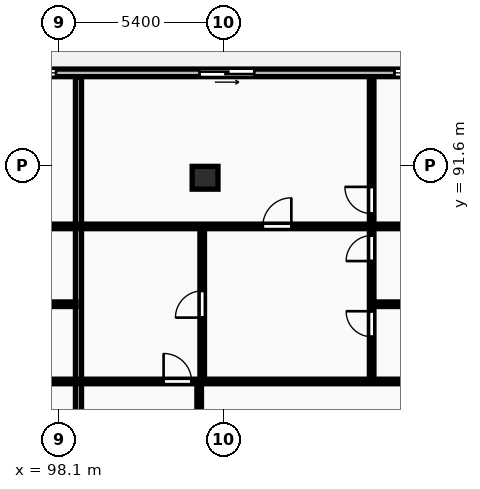
"""IFC4 building model, lengths in metres.
Left out: names, types, materials, properties, quantities, classifications, styles, units other than length and angle.
Written with IfcOpenShell. Run it as: python <this file> out.ifc"""

import sys

from ifc_helpers import new_model, si_unit, direction, frame, frame_2d, origin, origin_2d, place, context, subcontext, project, spatial, rectangle, extrude, element, fill, save


model = new_model("IFC4")
c1 = context("Model", 3, precision=1e-05, world=origin(), true_north=direction((0.0, 1.0)))
c2 = subcontext(c1, "Body", "Model", "MODEL_VIEW")
j1 = project(units=[si_unit("LENGTHUNIT", "METRE"), si_unit("PLANEANGLEUNIT", "RADIAN")], contexts=[c1])
p1 = place(None, origin())
s1 = spatial("IfcSite", under=j1, at=p1, CompositionType="ELEMENT")
p2 = place(p1, origin())
s2 = spatial("IfcBuilding", under=s1, at=p2, CompositionType="ELEMENT")
p3 = place(p2, frame((0.0, 0.0, 207.6)))
s3 = spatial("IfcBuildingStorey", under=s2, at=p3, CompositionType="ELEMENT", Elevation=207.6)
p4 = place(p3, frame((102.9, 91.2, 0.0), z_axis=(0.0, 0.0, 1.0), x_axis=(1.0, 0.0, 0.0)))
e1 = element("IfcColumn", 1, at=p4, inside=s3, PredefinedType="COLUMN", context=c2, shape_type="SweptSolid", body=[
    extrude(rectangle(XDim=0.85, YDim=0.75, at=origin_2d()), origin(), (0.0, 0.0, 1.0), 3.25),
])
p5 = place(p3, frame((128.4, 94.65, 0.0), z_axis=(0.0, 0.0, 1.0), x_axis=(-1.0, 0.0, 0.0)))
e2 = element("IfcWall", 2, at=p5, inside=s3, PredefinedType="STANDARD", context=c2, shape_type="SweptSolid", body=[
    extrude(rectangle(XDim=68.6, YDim=0.25, at=frame_2d((34.3, 0.0))), origin(), (0.0, 0.0, 1.0), 2.97),
])
p6 = place(p5, frame((62.6, 0.0, 0.0)))
e3 = element("IfcOpeningElement", 3, at=p6, cuts=e2, PredefinedType="OPENING", context=c2, shape_type="SweptSolid", body=[
    extrude(rectangle(XDim=1.8, YDim=2.2, at=frame_2d((0.9, 1.1))), frame((0.0, 0.135, 0.0), z_axis=(0.0, -1.0, 0.0), x_axis=(1.0, 0.0, 0.0)), (0.0, 0.0, 1.0), 0.27),
])
p7 = place(p5, frame((56.252, 0.0, 0.85)))
e4 = element("IfcOpeningElement", 4, at=p7, cuts=e2, PredefinedType="OPENING", context=c2, shape_type="SweptSolid", body=[
    extrude(rectangle(XDim=1.8, YDim=1.8, at=frame_2d((0.9, 0.9))), frame((0.0, 0.135, 0.0), z_axis=(0.0, -1.0, 0.0), x_axis=(1.0, 0.0, 0.0)), (0.0, 0.0, 1.0), 0.27),
])
p8 = place(p5, frame((49.882, 0.0, 0.0)))
e5 = element("IfcOpeningElement", 5, at=p8, cuts=e2, PredefinedType="OPENING", context=c2, shape_type="SweptSolid", body=[
    extrude(rectangle(XDim=1.8, YDim=2.2, at=frame_2d((0.9, 1.1))), frame((0.0, 0.135, 0.0), z_axis=(0.0, -1.0, 0.0), x_axis=(1.0, 0.0, 0.0)), (0.0, 0.0, 1.0), 0.27),
])
p9 = place(p5, frame((43.47, 0.0, 0.85)))
e6 = element("IfcOpeningElement", 6, at=p9, cuts=e2, PredefinedType="OPENING", context=c2, shape_type="SweptSolid", body=[
    extrude(rectangle(XDim=1.8, YDim=1.8, at=frame_2d((0.9, 0.9))), frame((0.0, 0.135, 0.0), z_axis=(0.0, -1.0, 0.0), x_axis=(1.0, 0.0, 0.0)), (0.0, 0.0, 1.0), 0.27),
])
p10 = place(p5, frame((36.75, 0.0, 0.0)))
e7 = element("IfcOpeningElement", 7, at=p10, cuts=e2, PredefinedType="OPENING", context=c2, shape_type="SweptSolid", body=[
    extrude(rectangle(XDim=1.8, YDim=2.2, at=frame_2d((0.9, 1.1))), frame((0.0, 0.135, 0.0), z_axis=(0.0, -1.0, 0.0), x_axis=(1.0, 0.0, 0.0)), (0.0, 0.0, 1.0), 0.27),
])
p11 = place(p5, frame((30.402, 0.0, 0.85)))
e8 = element("IfcOpeningElement", 8, at=p11, cuts=e2, PredefinedType="OPENING", context=c2, shape_type="SweptSolid", body=[
    extrude(rectangle(XDim=1.8, YDim=1.8, at=frame_2d((0.9, 0.9))), frame((0.0, 0.135, 0.0), z_axis=(0.0, -1.0, 0.0), x_axis=(1.0, 0.0, 0.0)), (0.0, 0.0, 1.0), 0.27),
])
p12 = place(p5, frame((23.882, 0.0, 0.0)))
e9 = element("IfcOpeningElement", 9, at=p12, cuts=e2, PredefinedType="OPENING", context=c2, shape_type="SweptSolid", body=[
    extrude(rectangle(XDim=1.8, YDim=2.2, at=frame_2d((0.9, 1.1))), frame((0.0, 0.135, 0.0), z_axis=(0.0, -1.0, 0.0), x_axis=(1.0, 0.0, 0.0)), (0.0, 0.0, 1.0), 0.27),
])
p13 = place(p5, frame((17.47, 0.0, 0.85)))
e10 = element("IfcOpeningElement", 10, at=p13, cuts=e2, PredefinedType="OPENING", context=c2, shape_type="SweptSolid", body=[
    extrude(rectangle(XDim=1.8, YDim=1.8, at=frame_2d((0.9, 0.9))), frame((0.0, 0.135, 0.0), z_axis=(0.0, -1.0, 0.0), x_axis=(1.0, 0.0, 0.0)), (0.0, 0.0, 1.0), 0.27),
])
p14 = place(p5, frame((9.48, 0.0, 0.85)))
e11 = element("IfcOpeningElement", 11, at=p14, cuts=e2, PredefinedType="OPENING", context=c2, shape_type="SweptSolid", body=[
    extrude(rectangle(XDim=1.8, YDim=1.8, at=frame_2d((0.9, 0.9))), frame((0.0, 0.135, 0.0), z_axis=(0.0, -1.0, 0.0), x_axis=(1.0, 0.0, 0.0)), (0.0, 0.0, 1.0), 0.27),
])
p15 = place(p5, frame((5.23, 0.0, 0.85)))
e12 = element("IfcOpeningElement", 12, at=p15, cuts=e2, PredefinedType="OPENING", context=c2, shape_type="SweptSolid", body=[
    extrude(rectangle(XDim=2.4, YDim=1.9, at=frame_2d((1.2, 0.95))), frame((0.0, 0.135, 0.0), z_axis=(0.0, -1.0, 0.0), x_axis=(1.0, 0.0, 0.0)), (0.0, 0.0, 1.0), 0.27),
])
p16 = place(p5, frame((13.455, 0.0, 0.0)))
e13 = element("IfcOpeningElement", 13, at=p16, cuts=e2, PredefinedType="OPENING", context=c2, shape_type="SweptSolid", body=[
    extrude(rectangle(XDim=1.8, YDim=2.2, at=frame_2d((0.9, 1.1))), frame((0.0, 0.135, 0.0), z_axis=(0.0, -1.0, 0.0), x_axis=(1.0, 0.0, 0.0)), (0.0, 0.0, 1.0), 0.27),
])
p17 = place(p5, frame((1.025, 0.0, 0.85)))
e14 = element("IfcOpeningElement", 14, at=p17, cuts=e2, PredefinedType="OPENING", context=c2, shape_type="SweptSolid", body=[
    extrude(rectangle(XDim=2.4, YDim=1.9, at=frame_2d((1.2, 0.95))), frame((0.0, 0.135, 0.0), z_axis=(0.0, -1.0, 0.0), x_axis=(1.0, 0.0, 0.0)), (0.0, 0.0, 1.0), 0.27),
])
p18 = place(p3, frame((98.736, 70.18, 0.0), z_axis=(0.0, 0.0, 1.0), x_axis=(0.0, 1.0, 0.0)))
e15 = element("IfcWall", 15, at=p18, inside=s3, PredefinedType="PARTITIONING", context=c2, shape_type="SweptSolid", body=[
    extrude(rectangle(XDim=24.32, YDim=0.2, at=frame_2d((12.16, 0.0))), origin(), (0.0, 0.0, 1.0), 2.97),
])
p19 = place(p3, frame((95.64, 87.04, 0.0), z_axis=(0.0, 0.0, 1.0), x_axis=(1.0, 0.0, 0.0)))
e16 = element("IfcWall", 16, at=p19, inside=s3, PredefinedType="PARTITIONING", context=c2, shape_type="SweptSolid", body=[
    extrude(rectangle(XDim=3.016, YDim=0.15, at=frame_2d((1.508, 0.0))), origin(), (0.0, 0.0, 1.0), 2.97),
])
p20 = place(p3, frame((85.88, 84.5, 0.0), z_axis=(0.0, 0.0, 1.0), x_axis=(1.0, 0.0, 0.0)))
e17 = element("IfcWall", 17, at=p20, inside=s3, PredefinedType="PARTITIONING", context=c2, shape_type="SweptSolid", body=[
    extrude(rectangle(XDim=12.776, YDim=0.15, at=frame_2d((6.388, 0.0))), origin(), (0.0, 0.0, 1.0), 2.97),
])
p21 = place(p20, frame((2.72, 0.0, 0.0)))
e18 = element("IfcOpeningElement", 18, at=p21, cuts=e17, PredefinedType="OPENING", context=c2, shape_type="SweptSolid", body=[
    extrude(rectangle(XDim=0.92, YDim=2.08, at=frame_2d((0.46, 1.04))), frame((0.0, 0.085, 0.0), z_axis=(0.0, -1.0, 0.0), x_axis=(1.0, 0.0, 0.0)), (0.0, 0.0, 1.0), 0.17),
])
p22 = place(p3, frame((85.88, 89.6, 0.0), z_axis=(0.0, 0.0, 1.0), x_axis=(1.0, 0.0, 0.0)))
e19 = element("IfcWall", 19, at=p22, inside=s3, PredefinedType="PARTITIONING", context=c2, shape_type="SweptSolid", body=[
    extrude(rectangle(XDim=12.776, YDim=0.15, at=frame_2d((6.388, 0.0))), origin(), (0.0, 0.0, 1.0), 2.97),
])
p23 = place(p22, frame((5.206, 0.0, 0.0)))
e20 = element("IfcOpeningElement", 20, at=p23, cuts=e19, PredefinedType="OPENING", context=c2, shape_type="SweptSolid", body=[
    extrude(rectangle(XDim=0.94, YDim=2.1, at=frame_2d((0.47, 1.05))), frame((0.0, 0.085, 0.0), z_axis=(0.0, -1.0, 0.0), x_axis=(1.0, 0.0, 0.0)), (0.0, 0.0, 1.0), 0.17),
])
p24 = place(p3, frame((102.706, 70.16, 0.0), z_axis=(0.0, 0.0, 1.0), x_axis=(0.0, 1.0, 0.0)))
e21 = element("IfcWall", 21, at=p24, inside=s3, PredefinedType="PARTITIONING", context=c2, shape_type="SweptSolid", body=[
    extrude(rectangle(XDim=14.3, YDim=0.15, at=frame_2d((7.15, 0.0))), origin(), (0.0, 0.0, 1.0), 2.277),
])
p25 = place(p24, frame((6.02, 0.0, 0.0)))
e22 = element("IfcOpeningElement", 22, at=p25, cuts=e21, PredefinedType="OPENING", context=c2, shape_type="SweptSolid", body=[
    extrude(rectangle(XDim=0.88, YDim=2.06, at=frame_2d((0.44, 1.03))), frame((0.0, 0.085, 0.0), z_axis=(0.0, -1.0, 0.0), x_axis=(1.0, 0.0, 0.0)), (0.0, 0.0, 1.0), 0.17),
])
p26 = place(p3, frame((102.806, 84.54, 0.0), z_axis=(0.0, 0.0, 1.0), x_axis=(0.0, 1.0, 0.0)))
e23 = element("IfcWall", 23, at=p26, inside=s3, PredefinedType="PARTITIONING", context=c2, shape_type="SweptSolid", body=[
    extrude(rectangle(XDim=5.0, YDim=0.15, at=frame_2d((2.5, 0.0))), origin(), (0.0, 0.0, 1.0), 2.277),
])
p27 = place(p26, frame((2.06, 0.0, 0.0)))
e24 = element("IfcOpeningElement", 24, at=p27, cuts=e23, PredefinedType="OPENING", context=c2, shape_type="SweptSolid", body=[
    extrude(rectangle(XDim=0.88, YDim=2.06, at=frame_2d((0.44, 1.03))), frame((0.0, 0.085, 0.0), z_axis=(0.0, -1.0, 0.0), x_axis=(1.0, 0.0, 0.0)), (0.0, 0.0, 1.0), 0.17),
])
p28 = place(p3, frame((108.44, 87.04, 0.0), z_axis=(0.0, 0.0, 1.0), x_axis=(1.0, 0.0, 0.0)))
e25 = element("IfcWall", 25, at=p28, inside=s3, PredefinedType="PARTITIONING", context=c2, shape_type="SweptSolid", body=[
    extrude(rectangle(XDim=3.28, YDim=0.15, at=frame_2d((1.64, 0.0))), origin(), (0.0, 0.0, 1.0), 2.97),
])
p29 = place(p3, frame((108.38, 84.54, 0.0), z_axis=(0.0, 0.0, 1.0), x_axis=(0.0, 1.0, 0.0)))
e26 = element("IfcWall", 26, at=p29, inside=s3, PredefinedType="PARTITIONING", context=c2, shape_type="SweptSolid", body=[
    extrude(rectangle(XDim=9.96, YDim=0.15, at=frame_2d((4.98, 0.0))), origin(), (0.0, 0.0, 1.0), 2.97),
])
p30 = place(p29, frame((1.43, 0.0, 0.0)))
e27 = element("IfcOpeningElement", 27, at=p30, cuts=e26, PredefinedType="OPENING", context=c2, shape_type="SweptSolid", body=[
    extrude(rectangle(XDim=0.84, YDim=2.04, at=frame_2d((0.42, 1.02))), frame((0.0, 0.085, 0.0), z_axis=(0.0, -1.0, 0.0), x_axis=(1.0, 0.0, 0.0)), (0.0, 0.0, 1.0), 0.17),
])
p31 = place(p29, frame((3.92, 0.0, 0.0)))
e28 = element("IfcOpeningElement", 28, at=p31, cuts=e26, PredefinedType="OPENING", context=c2, shape_type="SweptSolid", body=[
    extrude(rectangle(XDim=0.84, YDim=2.04, at=frame_2d((0.42, 1.02))), frame((0.0, 0.085, 0.0), z_axis=(0.0, -1.0, 0.0), x_axis=(1.0, 0.0, 0.0)), (0.0, 0.0, 1.0), 0.17),
])
p32 = place(p29, frame((5.48, 0.0, 0.0)))
e29 = element("IfcOpeningElement", 29, at=p32, cuts=e26, PredefinedType="OPENING", context=c2, shape_type="SweptSolid", body=[
    extrude(rectangle(XDim=0.88, YDim=2.06, at=frame_2d((0.44, 1.03))), frame((0.0, 0.085, 0.0), z_axis=(0.0, -1.0, 0.0), x_axis=(1.0, 0.0, 0.0)), (0.0, 0.0, 1.0), 0.17),
])
p33 = place(p3, frame((98.816, 84.5, 0.0), z_axis=(0.0, 0.0, 1.0), x_axis=(1.0, 0.0, 0.0)))
e30 = element("IfcWall", 30, at=p33, inside=s3, PredefinedType="PARTITIONING", context=c2, shape_type="SweptSolid", body=[
    extrude(rectangle(XDim=12.904, YDim=0.15, at=frame_2d((6.452, 0.0))), origin(), (0.0, 0.0, 1.0), 2.97),
])
p34 = place(p33, frame((2.72, 0.0, 0.0)))
e31 = element("IfcOpeningElement", 31, at=p34, cuts=e30, PredefinedType="OPENING", context=c2, shape_type="SweptSolid", body=[
    extrude(rectangle(XDim=0.92, YDim=2.08, at=frame_2d((0.46, 1.04))), frame((0.0, 0.085, 0.0), z_axis=(0.0, -1.0, 0.0), x_axis=(1.0, 0.0, 0.0)), (0.0, 0.0, 1.0), 0.17),
])
p35 = place(p3, frame((98.816, 89.6, 0.0), z_axis=(0.0, 0.0, 1.0), x_axis=(1.0, 0.0, 0.0)))
e32 = element("IfcWall", 32, at=p35, inside=s3, PredefinedType="PARTITIONING", context=c2, shape_type="SweptSolid", body=[
    extrude(rectangle(XDim=12.904, YDim=0.15, at=frame_2d((6.452, 0.0))), origin(), (0.0, 0.0, 1.0), 2.97),
])
p36 = place(p35, frame((5.982, 0.0, 0.0)))
e33 = element("IfcOpeningElement", 33, at=p36, cuts=e32, PredefinedType="OPENING", context=c2, shape_type="SweptSolid", body=[
    extrude(rectangle(XDim=0.94, YDim=2.1, at=frame_2d((0.47, 1.05))), frame((0.0, 0.085, 0.0), z_axis=(0.0, -1.0, 0.0), x_axis=(1.0, 0.0, 0.0)), (0.0, 0.0, 1.0), 0.17),
])
p37 = place(p11, origin())
e34 = element("IfcWindow", 34, at=p37, inside=s3, PartitioningType="SINGLE_PANEL", PredefinedType="WINDOW", context=c2, shape_type="SweptSolid", body=[
    extrude(rectangle(XDim=1.8, YDim=1.8, at=frame_2d((0.9, 0.9))), frame((0.0, 0.03, 0.0), z_axis=(0.0, -1.0, 0.0), x_axis=(1.0, 0.0, 0.0)), (0.0, 0.0, 1.0), 0.06),
])
fill(e8, e34)
p38 = place(p12, origin())
e35 = element("IfcDoor", 35, at=p38, inside=s3, OperationType="SLIDING_TO_LEFT", PredefinedType="DOOR", context=c2, shape_type="SweptSolid", body=[
    extrude(rectangle(XDim=1.8, YDim=2.2, at=frame_2d((0.9, 1.1))), frame((0.0, 0.025, 0.0), z_axis=(0.0, -1.0, 0.0), x_axis=(1.0, 0.0, 0.0)), (0.0, 0.0, 1.0), 0.05),
])
fill(e9, e35)
p39 = place(p13, origin())
e36 = element("IfcWindow", 36, at=p39, inside=s3, PartitioningType="SINGLE_PANEL", PredefinedType="WINDOW", context=c2, shape_type="SweptSolid", body=[
    extrude(rectangle(XDim=1.8, YDim=1.8, at=frame_2d((0.9, 0.9))), frame((0.0, 0.03, 0.0), z_axis=(0.0, -1.0, 0.0), x_axis=(1.0, 0.0, 0.0)), (0.0, 0.0, 1.0), 0.06),
])
fill(e10, e36)
p40 = place(p27, origin())
e37 = element("IfcDoor", 37, at=p40, inside=s3, OperationType="SINGLE_SWING_LEFT", PredefinedType="DOOR", context=c2, shape_type="SweptSolid", body=[
    extrude(rectangle(XDim=0.88, YDim=2.06, at=frame_2d((0.44, 1.03))), frame((0.0, 0.025, 0.0), z_axis=(0.0, -1.0, 0.0), x_axis=(1.0, 0.0, 0.0)), (0.0, 0.0, 1.0), 0.05),
])
fill(e24, e37)
p41 = place(p30, origin())
e38 = element("IfcDoor", 38, at=p41, inside=s3, OperationType="SINGLE_SWING_RIGHT", PredefinedType="DOOR", context=c2, shape_type="SweptSolid", body=[
    extrude(rectangle(XDim=0.84, YDim=2.04, at=frame_2d((0.42, 1.02))), frame((0.0, 0.025, 0.0), z_axis=(0.0, -1.0, 0.0), x_axis=(1.0, 0.0, 0.0)), (0.0, 0.0, 1.0), 0.05),
])
fill(e27, e38)
p42 = place(p31, origin())
e39 = element("IfcDoor", 39, at=p42, inside=s3, OperationType="SINGLE_SWING_LEFT", PredefinedType="DOOR", context=c2, shape_type="SweptSolid", body=[
    extrude(rectangle(XDim=0.84, YDim=2.04, at=frame_2d((0.42, 1.02))), frame((0.0, 0.025, 0.0), z_axis=(0.0, -1.0, 0.0), x_axis=(1.0, 0.0, 0.0)), (0.0, 0.0, 1.0), 0.05),
])
fill(e28, e39)
p43 = place(p32, origin())
e40 = element("IfcDoor", 40, at=p43, inside=s3, OperationType="SINGLE_SWING_RIGHT", PredefinedType="DOOR", context=c2, shape_type="SweptSolid", body=[
    extrude(rectangle(XDim=0.88, YDim=2.06, at=frame_2d((0.44, 1.03))), frame((0.0, 0.025, 0.0), z_axis=(0.0, -1.0, 0.0), x_axis=(1.0, 0.0, 0.0)), (0.0, 0.0, 1.0), 0.05),
])
fill(e29, e40)
p44 = place(p34, origin())
e41 = element("IfcDoor", 41, at=p44, inside=s3, OperationType="SINGLE_SWING_LEFT", PredefinedType="DOOR", context=c2, shape_type="SweptSolid", body=[
    extrude(rectangle(XDim=0.92, YDim=2.08, at=frame_2d((0.46, 1.04))), frame((0.0, 0.025, 0.0), z_axis=(0.0, -1.0, 0.0), x_axis=(1.0, 0.0, 0.0)), (0.0, 0.0, 1.0), 0.05),
])
fill(e31, e41)
p45 = place(p36, origin())
e42 = element("IfcDoor", 42, at=p45, inside=s3, OperationType="SINGLE_SWING_RIGHT", PredefinedType="DOOR", context=c2, shape_type="SweptSolid", body=[
    extrude(rectangle(XDim=0.94, YDim=2.1, at=frame_2d((0.47, 1.05))), frame((0.0, 0.025, 0.0), z_axis=(0.0, -1.0, 0.0), x_axis=(1.0, 0.0, 0.0)), (0.0, 0.0, 1.0), 0.05),
])
fill(e33, e42)
save(model, sys.argv[1])
